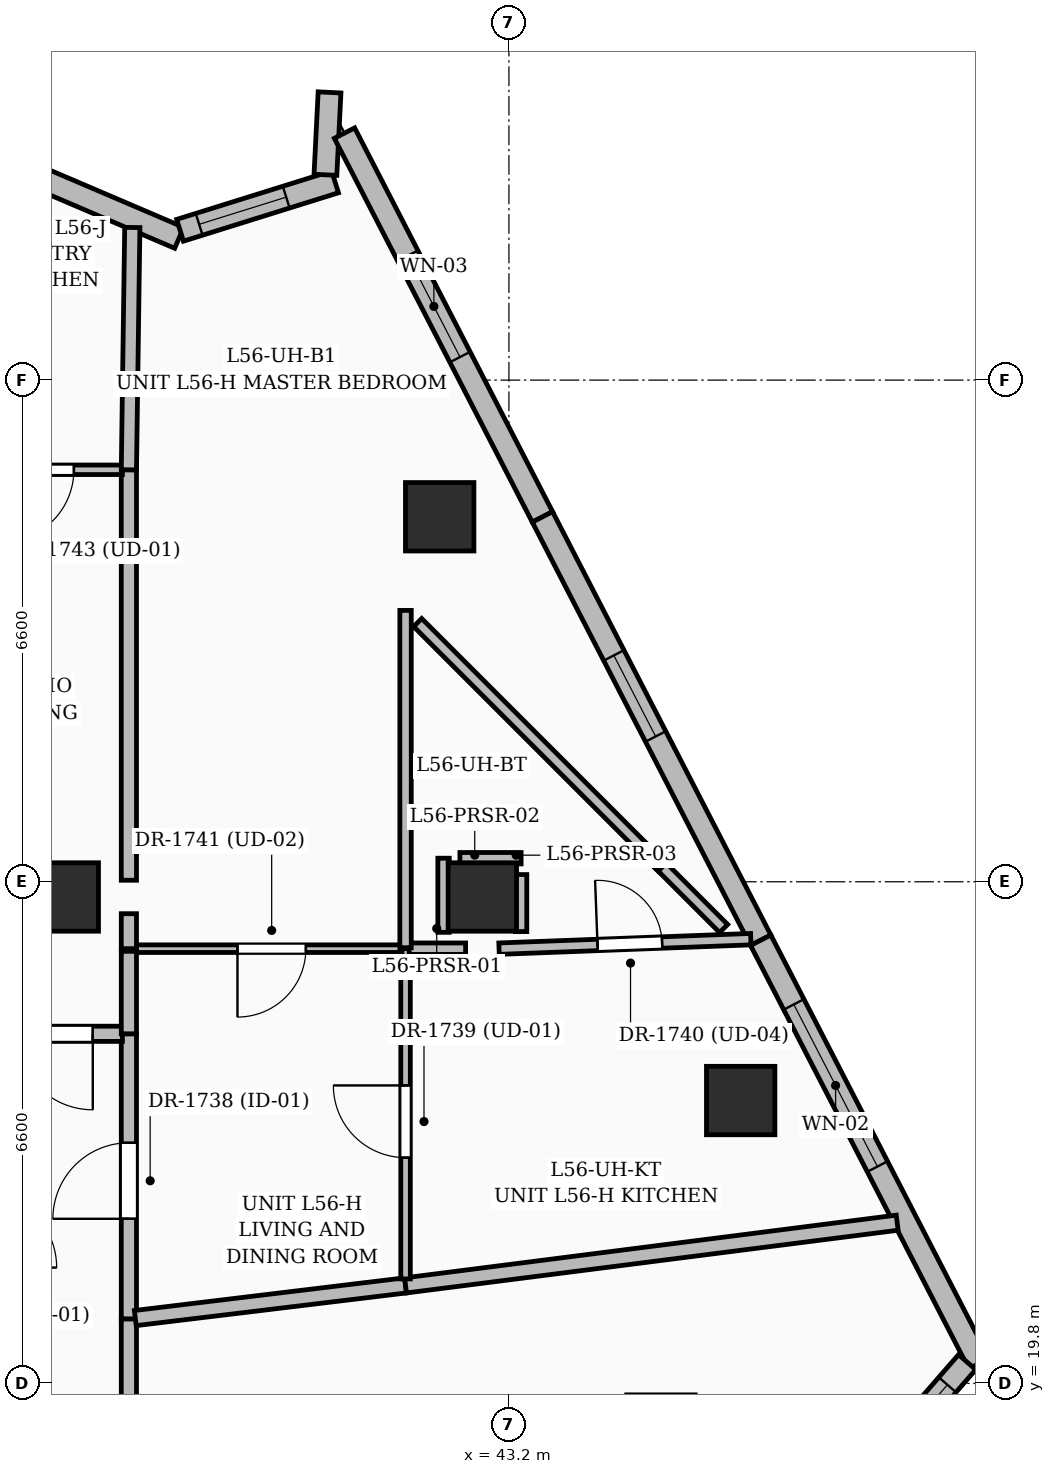
"""IFC4 building model, lengths in metres.
Left out: names, types, materials, properties, quantities, classifications, styles, units other than length and angle.
Written with IfcOpenShell. Run it as: python <this file> out.ifc"""

import sys

from ifc_helpers import new_model, si_unit, direction, frame, frame_2d, origin, origin_2d, place, context, subcontext, project, spatial, rectangle, extrude, element, fill, save


model = new_model("IFC4")
c1 = context("Model", 3, precision=1e-05, world=origin(), true_north=direction((0.0, 1.0)))
c2 = subcontext(c1, "Body", "Model", "MODEL_VIEW")
j1 = project(units=[si_unit("LENGTHUNIT", "METRE"), si_unit("PLANEANGLEUNIT", "RADIAN")], contexts=[c1])
p1 = place(None, origin())
s1 = spatial("IfcSite", under=j1, at=p1, CompositionType="ELEMENT")
p2 = place(p1, origin())
s2 = spatial("IfcBuilding", under=s1, at=p2, CompositionType="ELEMENT")
p3 = place(p2, frame((0.0, 0.0, 218.25)))
s3 = spatial("IfcBuildingStorey", under=s2, at=p3, CompositionType="ELEMENT", Elevation=218.25)
for number, where, z_axis, x_axis in (
    (1, (42.85, 26.2, 0.0), (0.0, 0.0, 1.0), (1.0, 0.0, 0.0)),
    (2, (37.35, 26.2, 0.0), (0.0, 0.0, 1.0), (1.0, 0.0, 0.0)),
    (3, (46.249, 23.522, 0.0), (0.0, 0.0, 1.0), (1.0, 0.0, 0.0)),
    (4, (42.289, 31.202, 0.0), (0.0, 0.0, 1.0), (1.0, 0.0, 0.0)),
):
    element("IfcColumn", number, at=place(p3, frame(where, z_axis=z_axis, x_axis=x_axis)), inside=s3, PredefinedType="COLUMN", context=c2, shape_type="SweptSolid", body=[
        extrude(rectangle(XDim=0.9, YDim=0.9, at=origin_2d()), origin(), (0.0, 0.0, 1.0), 3.75),
    ])
p4 = place(p3, frame((36.887, 35.716, 0.0), z_axis=(0.0, 0.0, 1.0), x_axis=(0.919567916171, -0.392931097711, 0.0)))
e5 = element("IfcWall", 5, at=p4, inside=s3, PredefinedType="SOLIDWALL", context=c2, shape_type="SweptSolid", body=[
    extrude(rectangle(XDim=2.147, YDim=0.3, at=frame_2d((1.074, 0.0))), origin(), (0.0, 0.0, 1.0), 3.5),
])
p5 = place(p3, frame((38.873, 34.971, 0.0), z_axis=(0.0, 0.0, 1.0), x_axis=(0.954555183372, 0.298034229407, 0.0)))
e6 = element("IfcWall", 6, at=p5, inside=s3, PredefinedType="SOLIDWALL", context=c2, shape_type="SweptSolid", body=[
    extrude(rectangle(XDim=2.136, YDim=0.3, at=frame_2d((1.068, 0.0))), origin(), (0.0, 0.0, 1.0), 3.5),
])
p6 = place(p5, frame((0.263, 0.0, 0.8)))
e7 = element("IfcOpeningElement", 7, at=p6, cuts=e6, PredefinedType="OPENING", context=c2, shape_type="SweptSolid", body=[
    extrude(rectangle(XDim=1.2, YDim=1.8, at=frame_2d((0.6, 0.9))), frame((0.0, 0.16, 0.0), z_axis=(0.0, -1.0, 0.0), x_axis=(1.0, 0.0, 0.0)), (0.0, 0.0, 1.0), 0.32),
])
p7 = place(p3, frame((40.786, 35.701, 0.0), z_axis=(0.0, 0.0, 1.0), x_axis=(0.05016199642, 0.998741094636, 0.0)))
e8 = element("IfcWall", 8, at=p7, inside=s3, PredefinedType="SOLIDWALL", context=c2, shape_type="SweptSolid", body=[
    extrude(rectangle(XDim=1.085, YDim=0.3, at=frame_2d((0.543, 0.0))), origin(), (0.0, 0.0, 1.0), 3.5),
])
p8 = place(p3, frame((41.037, 36.25, 0.0), z_axis=(0.0, 0.0, 1.0), x_axis=(0.458317776769, -0.888788397481, 0.0)))
e9 = element("IfcWall", 9, at=p8, inside=s3, PredefinedType="SOLIDWALL", context=c2, shape_type="SweptSolid", body=[
    extrude(rectangle(XDim=5.681, YDim=0.3, at=frame_2d((2.841, 0.0))), origin(), (0.0, 0.0, 1.0), 3.5),
])
p9 = place(p8, frame((1.815, 0.0, 0.6)))
e10 = element("IfcOpeningElement", 10, at=p9, cuts=e9, PredefinedType="OPENING", context=c2, shape_type="SweptSolid", body=[
    extrude(rectangle(XDim=1.5, YDim=2.1, at=frame_2d((0.75, 1.05))), frame((0.0, 0.16, 0.0), z_axis=(0.0, -1.0, 0.0), x_axis=(1.0, 0.0, 0.0)), (0.0, 0.0, 1.0), 0.32),
])
p10 = place(p3, frame((43.641, 31.2, 0.0), z_axis=(0.0, 0.0, 1.0), x_axis=(0.458306446078, -0.88879424024, 0.0)))
e11 = element("IfcWall", 11, at=p10, inside=s3, PredefinedType="SOLIDWALL", context=c2, shape_type="SweptSolid", body=[
    extrude(rectangle(XDim=6.266, YDim=0.3, at=frame_2d((3.133, 0.0))), origin(), (0.0, 0.0, 1.0), 3.5),
])
p11 = place(p10, frame((2.05, 0.0, 0.8)))
e12 = element("IfcOpeningElement", 12, at=p11, cuts=e11, PredefinedType="OPENING", context=c2, shape_type="SweptSolid", body=[
    extrude(rectangle(XDim=1.2, YDim=1.8, at=frame_2d((0.6, 0.9))), frame((0.0, 0.16, 0.0), z_axis=(0.0, -1.0, 0.0), x_axis=(1.0, 0.0, 0.0)), (0.0, 0.0, 1.0), 0.32),
])
p12 = place(p3, frame((46.512, 25.631, 0.0), z_axis=(0.0, 0.0, 1.0), x_axis=(0.458306446078, -0.88879424024, 0.0)))
e13 = element("IfcWall", 13, at=p12, inside=s3, PredefinedType="SOLIDWALL", context=c2, shape_type="SweptSolid", body=[
    extrude(rectangle(XDim=6.266, YDim=0.3, at=frame_2d((3.133, 0.0))), origin(), (0.0, 0.0, 1.0), 3.5),
])
p13 = place(p12, frame((0.95, 0.0, 0.6)))
e14 = element("IfcOpeningElement", 14, at=p13, cuts=e13, PredefinedType="OPENING", context=c2, shape_type="SweptSolid", body=[
    extrude(rectangle(XDim=2.4, YDim=2.1, at=frame_2d((1.2, 1.05))), frame((0.0, 0.16, 0.0), z_axis=(0.0, -1.0, 0.0), x_axis=(1.0, 0.0, 0.0)), (0.0, 0.0, 1.0), 0.32),
])
p14 = place(p3, frame((49.228, 20.08, 0.0), z_axis=(0.0, 0.0, 1.0), x_axis=(-0.656403307356, -0.754410165687, 0.0)))
e15 = element("IfcWall", 15, at=p14, inside=s3, PredefinedType="SOLIDWALL", context=c2, shape_type="SweptSolid", body=[
    extrude(rectangle(XDim=2.314, YDim=0.3, at=frame_2d((1.157, 0.0))), origin(), (0.0, 0.0, 1.0), 2.825),
])
p15 = place(p14, frame((0.395, 0.0, 0.8)))
e16 = element("IfcOpeningElement", 16, at=p15, cuts=e15, PredefinedType="OPENING", context=c2, shape_type="SweptSolid", body=[
    extrude(rectangle(XDim=1.2, YDim=1.8, at=frame_2d((0.6, 0.9))), frame((0.0, 0.16, 0.0), z_axis=(0.0, -1.0, 0.0), x_axis=(1.0, 0.0, 0.0)), (0.0, 0.0, 1.0), 0.32),
])
p16 = place(p3, frame((38.2, 16.835, 0.0), z_axis=(0.0, 0.0, 1.0), x_axis=(0.0, 1.0, 0.0)))
e17 = element("IfcWall", 17, at=p16, inside=s3, PredefinedType="PARTITIONING", context=c2, shape_type="SweptSolid", body=[
    extrude(rectangle(XDim=3.815, YDim=0.2, at=frame_2d((1.907, 0.0))), origin(), (0.0, 0.0, 1.0), 3.5),
])
p17 = place(p3, frame((38.2, 20.65, 0.0), z_axis=(0.0, 0.0, 1.0), x_axis=(0.0, 1.0, 0.0)))
e18 = element("IfcWall", 18, at=p17, inside=s3, PredefinedType="PARTITIONING", context=c2, shape_type="SweptSolid", body=[
    extrude(rectangle(XDim=3.75, YDim=0.2, at=frame_2d((1.875, 0.0))), origin(), (0.0, 0.0, 1.0), 3.5),
])
p18 = place(p17, frame((1.316, 0.0, 0.0)))
e19 = element("IfcOpeningElement", 19, at=p18, cuts=e18, PredefinedType="OPENING", context=c2, shape_type="SweptSolid", body=[
    extrude(rectangle(XDim=1.0, YDim=2.2, at=frame_2d((0.5, 1.1))), frame((0.0, 0.11, 0.0), z_axis=(0.0, -1.0, 0.0), x_axis=(1.0, 0.0, 0.0)), (0.0, 0.0, 1.0), 0.22),
])
p19 = place(p3, frame((38.115, 24.4, 0.0), z_axis=(0.0, 0.0, 1.0), x_axis=(-1.0, 0.0, 0.0)))
e20 = element("IfcWall", 20, at=p19, inside=s3, PredefinedType="PARTITIONING", context=c2, shape_type="SweptSolid", body=[
    extrude(rectangle(XDim=1.865, YDim=0.2, at=frame_2d((0.933, 0.0))), origin(), (0.0, 0.0, 1.0), 2.685),
])
p20 = place(p19, frame((0.39, 0.0, 0.0)))
e21 = element("IfcOpeningElement", 21, at=p20, cuts=e20, PredefinedType="OPENING", context=c2, shape_type="SweptSolid", body=[
    extrude(rectangle(XDim=1.0, YDim=2.2, at=frame_2d((0.5, 1.1))), frame((0.0, 0.11, 0.0), z_axis=(0.0, -1.0, 0.0), x_axis=(1.0, 0.0, 0.0)), (0.0, 0.0, 1.0), 0.22),
])
p21 = place(p3, frame((41.84, 21.09, 0.0), z_axis=(0.0, 0.0, 1.0), x_axis=(-0.99276902526, -0.120040253604, 0.0)))
e22 = element("IfcWall", 22, at=p21, inside=s3, PredefinedType="PARTITIONING", context=c2, shape_type="SweptSolid", body=[
    extrude(rectangle(XDim=3.582, YDim=0.2, at=frame_2d((1.791, 0.0))), origin(), (0.0, 0.0, 1.0), 3.5),
])
p22 = place(p3, frame((48.308, 21.915, 0.0), z_axis=(0.0, 0.0, 1.0), x_axis=(-0.991964283105, -0.126518224158, 0.0)))
e23 = element("IfcWall", 23, at=p22, inside=s3, PredefinedType="PARTITIONING", context=c2, shape_type="SweptSolid", body=[
    extrude(rectangle(XDim=6.521, YDim=0.2, at=frame_2d((3.26, 0.0))), origin(), (0.0, 0.0, 1.0), 2.685),
])
p23 = place(p3, frame((41.84, 21.175, 0.0), z_axis=(0.0, 0.0, 1.0), x_axis=(0.0, 1.0, 0.0)))
e24 = element("IfcWall", 24, at=p23, inside=s3, PredefinedType="PARTITIONING", context=c2, shape_type="SweptSolid", body=[
    extrude(rectangle(XDim=4.345, YDim=0.125, at=frame_2d((2.172, 0.0))), origin(), (0.0, 0.0, 1.0), 3.5),
])
p24 = place(p23, frame((1.596, 0.0, 0.0)))
e25 = element("IfcOpeningElement", 25, at=p24, cuts=e24, PredefinedType="OPENING", context=c2, shape_type="SweptSolid", body=[
    extrude(rectangle(XDim=0.95, YDim=2.2, at=frame_2d((0.475, 1.1))), frame((0.0, 0.072, 0.0), z_axis=(0.0, -1.0, 0.0), x_axis=(1.0, 0.0, 0.0)), (0.0, 0.0, 1.0), 0.145),
])
p25 = place(p3, frame((41.792, 25.52, 0.0), z_axis=(0.0, 0.0, 1.0), x_axis=(-1.0, 0.0, 0.0)))
e26 = element("IfcWall", 26, at=p25, inside=s3, PredefinedType="PARTITIONING", context=c2, shape_type="SweptSolid", body=[
    extrude(rectangle(XDim=3.593, YDim=0.1, at=frame_2d((1.796, 0.0))), origin(), (0.0, 0.0, 1.0), 3.5),
])
p26 = place(p25, frame((1.264, 0.0, 0.0)))
e27 = element("IfcOpeningElement", 27, at=p26, cuts=e26, PredefinedType="OPENING", context=c2, shape_type="SweptSolid", body=[
    extrude(rectangle(XDim=0.9, YDim=2.15, at=frame_2d((0.45, 1.075))), frame((0.0, 0.06, 0.0), z_axis=(0.0, -1.0, 0.0), x_axis=(1.0, 0.0, 0.0)), (0.0, 0.0, 1.0), 0.12),
])
p27 = place(p3, frame((38.2, 25.485, 0.0), z_axis=(0.0, 0.0, 1.0), x_axis=(0.0, -1.0, 0.0)))
e28 = element("IfcWall", 28, at=p27, inside=s3, PredefinedType="PARTITIONING", context=c2, shape_type="SweptSolid", body=[
    extrude(rectangle(XDim=1.085, YDim=0.2, at=frame_2d((0.542, 0.0))), origin(), (0.0, 0.0, 1.0), 3.5),
])
p28 = place(p3, frame((41.887, 25.52, 0.0), z_axis=(0.0, 0.0, 1.0), x_axis=(1.0, 0.0, 0.0)))
e29 = element("IfcWall", 29, at=p28, inside=s3, PredefinedType="PARTITIONING", context=c2, shape_type="SweptSolid", body=[
    extrude(rectangle(XDim=0.742, YDim=0.15, at=frame_2d((0.371, 0.0))), origin(), (0.0, 0.0, 1.0), 3.5),
])
p29 = place(p3, frame((43.07, 25.52, 0.0), z_axis=(0.0, 0.0, 1.0), x_axis=(0.999288552853, 0.037714561334, 0.0)))
e30 = element("IfcWall", 30, at=p29, inside=s3, PredefinedType="PARTITIONING", context=c2, shape_type="SweptSolid", body=[
    extrude(rectangle(XDim=3.314, YDim=0.15, at=frame_2d((1.657, 0.0))), origin(), (0.0, 0.0, 1.0), 2.685),
])
p30 = place(p29, frame((1.296, 0.0, 0.0)))
e31 = element("IfcOpeningElement", 31, at=p30, cuts=e30, PredefinedType="OPENING", context=c2, shape_type="SweptSolid", body=[
    extrude(rectangle(XDim=0.85, YDim=2.1, at=frame_2d((0.425, 1.05))), frame((0.0, 0.085, 0.0), z_axis=(0.0, -1.0, 0.0), x_axis=(1.0, 0.0, 0.0)), (0.0, 0.0, 1.0), 0.17),
])
p31 = place(p3, frame((41.84, 29.97, 0.0), z_axis=(0.0, 0.0, 1.0), x_axis=(0.0, -1.0, 0.0)))
e32 = element("IfcWall", 32, at=p31, inside=s3, PredefinedType="PARTITIONING", context=c2, shape_type="SweptSolid", body=[
    extrude(rectangle(XDim=4.438, YDim=0.15, at=frame_2d((2.219, 0.0))), origin(), (0.0, 0.0, 1.0), 2.52),
])
p32 = place(p3, frame((38.2, 25.98, 0.0), z_axis=(0.0, 0.0, 1.0), x_axis=(0.0, -1.0, 0.0)))
e33 = element("IfcWall", 33, at=p32, inside=s3, PredefinedType="PARTITIONING", context=c2, shape_type="SweptSolid", body=[
    extrude(rectangle(XDim=0.46, YDim=0.2, at=frame_2d((0.23, 0.0))), origin(), (0.0, 0.0, 1.0), 2.52),
])
p33 = place(p3, frame((38.2, 31.82, 0.0), z_axis=(0.0, 0.0, 1.0), x_axis=(0.0, -1.0, 0.0)))
e34 = element("IfcWall", 34, at=p33, inside=s3, PredefinedType="PARTITIONING", context=c2, shape_type="SweptSolid", body=[
    extrude(rectangle(XDim=5.4, YDim=0.2, at=frame_2d((2.7, 0.0))), origin(), (0.0, 0.0, 1.0), 2.52),
])
p34 = place(p3, frame((38.115, 31.82, 0.0), z_axis=(0.0, 0.0, 1.0), x_axis=(-1.0, 0.0, 0.0)))
e35 = element("IfcWall", 35, at=p34, inside=s3, PredefinedType="PARTITIONING", context=c2, shape_type="SweptSolid", body=[
    extrude(rectangle(XDim=2.195, YDim=0.125, at=frame_2d((1.098, 0.0))), origin(), (0.0, 0.0, 1.0), 3.5),
])
p35 = place(p34, frame((0.638, 0.0, 0.0)))
e36 = element("IfcOpeningElement", 36, at=p35, cuts=e35, PredefinedType="OPENING", context=c2, shape_type="SweptSolid", body=[
    extrude(rectangle(XDim=0.95, YDim=2.2, at=frame_2d((0.475, 1.1))), frame((0.0, 0.072, 0.0), z_axis=(0.0, -1.0, 0.0), x_axis=(1.0, 0.0, 0.0)), (0.0, 0.0, 1.0), 0.145),
])
p36 = place(p3, frame((38.245, 35.008, 0.0), z_axis=(0.0, 0.0, 1.0), x_axis=(-0.014166138476, -0.999899655226, 0.0)))
e37 = element("IfcWall", 37, at=p36, inside=s3, PredefinedType="PARTITIONING", context=c2, shape_type="SweptSolid", body=[
    extrude(rectangle(XDim=3.188, YDim=0.2, at=frame_2d((1.594, 0.0))), origin(), (0.0, 0.0, 1.0), 3.5),
])
p37 = place(p3, frame((42.34, 25.735, 0.0), z_axis=(0.0, 0.0, 1.0), x_axis=(0.0, 1.0, 0.0)))
e38 = element("IfcWall", 38, at=p37, inside=s3, PredefinedType="PARTITIONING", context=c2, shape_type="SweptSolid", body=[
    extrude(rectangle(XDim=0.975, YDim=0.15, at=frame_2d((0.487, 0.0))), origin(), (0.0, 0.0, 1.0), 2.52),
])
p38 = place(p3, frame((42.555, 26.71, 0.0), z_axis=(0.0, 0.0, 1.0), x_axis=(1.0, 0.0, 0.0)))
e39 = element("IfcWall", 39, at=p38, inside=s3, PredefinedType="PARTITIONING", context=c2, shape_type="SweptSolid", body=[
    extrude(rectangle(XDim=0.805, YDim=0.15, at=frame_2d((0.403, 0.0))), origin(), (0.0, 0.0, 1.0), 2.685),
])
p39 = place(p3, frame((43.36, 26.495, 0.0), z_axis=(0.0, 0.0, 1.0), x_axis=(0.0, -1.0, 0.0)))
e40 = element("IfcWall", 40, at=p39, inside=s3, PredefinedType="PARTITIONING", context=c2, shape_type="SweptSolid", body=[
    extrude(rectangle(XDim=0.75, YDim=0.15, at=frame_2d((0.375, 0.0))), origin(), (0.0, 0.0, 1.0), 3.5),
])
p40 = place(p3, frame((46.025, 25.785, 0.0), z_axis=(0.0, 0.0, 1.0), x_axis=(-0.707106781187, 0.707106781187, 0.0)))
e41 = element("IfcWall", 41, at=p40, inside=s3, PredefinedType="PARTITIONING", context=c2, shape_type="SweptSolid", body=[
    extrude(rectangle(XDim=1.2, YDim=0.15, at=frame_2d((0.6, 0.0))), origin(), (0.0, 0.0, 1.0), 3.5),
])
p41 = place(p3, frame((45.217, 26.593, 0.0), z_axis=(0.0, 0.0, 1.0), x_axis=(-0.707079952633, 0.707133608723, 0.0)))
e42 = element("IfcWall", 42, at=p41, inside=s3, PredefinedType="PARTITIONING", context=c2, shape_type="SweptSolid", body=[
    extrude(rectangle(XDim=4.55, YDim=0.15, at=frame_2d((2.275, 0.0))), origin(), (0.0, 0.0, 1.0), 3.5),
])
p42 = place(p6, origin())
e43 = element("IfcWindow", 43, at=p42, inside=s3, PartitioningType="SINGLE_PANEL", PredefinedType="WINDOW", context=c2, shape_type="SweptSolid", body=[
    extrude(rectangle(XDim=1.2, YDim=1.8, at=frame_2d((0.6, 0.9))), frame((0.0, 0.03, 0.0), z_axis=(0.0, -1.0, 0.0), x_axis=(1.0, 0.0, 0.0)), (0.0, 0.0, 1.0), 0.06),
])
fill(e7, e43)
p43 = place(p9, origin())
e44 = element("IfcWindow", 44, at=p43, inside=s3, PartitioningType="SINGLE_PANEL", PredefinedType="WINDOW", context=c2, shape_type="SweptSolid", body=[
    extrude(rectangle(XDim=1.5, YDim=2.1, at=frame_2d((0.75, 1.05))), frame((0.0, 0.03, 0.0), z_axis=(0.0, -1.0, 0.0), x_axis=(1.0, 0.0, 0.0)), (0.0, 0.0, 1.0), 0.06),
])
fill(e10, e44)
p44 = place(p11, origin())
e45 = element("IfcWindow", 45, at=p44, inside=s3, PartitioningType="SINGLE_PANEL", PredefinedType="WINDOW", context=c2, shape_type="SweptSolid", body=[
    extrude(rectangle(XDim=1.2, YDim=1.8, at=frame_2d((0.6, 0.9))), frame((0.0, 0.03, 0.0), z_axis=(0.0, -1.0, 0.0), x_axis=(1.0, 0.0, 0.0)), (0.0, 0.0, 1.0), 0.06),
])
fill(e12, e45)
p45 = place(p13, origin())
e46 = element("IfcWindow", 46, at=p45, inside=s3, PartitioningType="SINGLE_PANEL", PredefinedType="WINDOW", context=c2, shape_type="SweptSolid", body=[
    extrude(rectangle(XDim=2.4, YDim=2.1, at=frame_2d((1.2, 1.05))), frame((0.0, 0.03, 0.0), z_axis=(0.0, -1.0, 0.0), x_axis=(1.0, 0.0, 0.0)), (0.0, 0.0, 1.0), 0.06),
])
fill(e14, e46)
p46 = place(p15, origin())
e47 = element("IfcWindow", 47, at=p46, inside=s3, PartitioningType="SINGLE_PANEL", PredefinedType="WINDOW", context=c2, shape_type="SweptSolid", body=[
    extrude(rectangle(XDim=1.2, YDim=1.8, at=frame_2d((0.6, 0.9))), frame((0.0, 0.03, 0.0), z_axis=(0.0, -1.0, 0.0), x_axis=(1.0, 0.0, 0.0)), (0.0, 0.0, 1.0), 0.06),
])
fill(e16, e47)
p47 = place(p18, origin())
e48 = element("IfcDoor", 48, at=p47, inside=s3, OperationType="SINGLE_SWING_LEFT", PredefinedType="DOOR", context=c2, shape_type="SweptSolid", body=[
    extrude(rectangle(XDim=1.0, YDim=2.2, at=frame_2d((0.5, 1.1))), frame((0.0, 0.025, 0.0), z_axis=(0.0, -1.0, 0.0), x_axis=(1.0, 0.0, 0.0)), (0.0, 0.0, 1.0), 0.05),
])
fill(e19, e48)
p48 = place(p24, origin())
e49 = element("IfcDoor", 49, at=p48, inside=s3, OperationType="SINGLE_SWING_RIGHT", PredefinedType="DOOR", context=c2, shape_type="SweptSolid", body=[
    extrude(rectangle(XDim=0.95, YDim=2.2, at=frame_2d((0.475, 1.1))), frame((0.0, 0.025, 0.0), z_axis=(0.0, -1.0, 0.0), x_axis=(1.0, 0.0, 0.0)), (0.0, 0.0, 1.0), 0.05),
])
fill(e25, e49)
p49 = place(p30, origin())
e50 = element("IfcDoor", 50, at=p49, inside=s3, OperationType="SINGLE_SWING_LEFT", PredefinedType="DOOR", context=c2, shape_type="SweptSolid", body=[
    extrude(rectangle(XDim=0.85, YDim=2.1, at=frame_2d((0.425, 1.05))), frame((0.0, 0.025, 0.0), z_axis=(0.0, -1.0, 0.0), x_axis=(1.0, 0.0, 0.0)), (0.0, 0.0, 1.0), 0.05),
])
fill(e31, e50)
p50 = place(p26, origin())
e51 = element("IfcDoor", 51, at=p50, inside=s3, OperationType="SINGLE_SWING_RIGHT", PredefinedType="DOOR", context=c2, shape_type="SweptSolid", body=[
    extrude(rectangle(XDim=0.9, YDim=2.15, at=frame_2d((0.45, 1.075))), frame((0.0, 0.025, 0.0), z_axis=(0.0, -1.0, 0.0), x_axis=(1.0, 0.0, 0.0)), (0.0, 0.0, 1.0), 0.05),
])
fill(e27, e51)
p51 = place(p20, origin())
e52 = element("IfcDoor", 52, at=p51, inside=s3, OperationType="SINGLE_SWING_LEFT", PredefinedType="DOOR", context=c2, shape_type="SweptSolid", body=[
    extrude(rectangle(XDim=1.0, YDim=2.2, at=frame_2d((0.5, 1.1))), frame((0.0, 0.025, 0.0), z_axis=(0.0, -1.0, 0.0), x_axis=(1.0, 0.0, 0.0)), (0.0, 0.0, 1.0), 0.05),
])
fill(e21, e52)
p52 = place(p35, origin())
e53 = element("IfcDoor", 53, at=p52, inside=s3, OperationType="SINGLE_SWING_RIGHT", PredefinedType="DOOR", context=c2, shape_type="SweptSolid", body=[
    extrude(rectangle(XDim=0.95, YDim=2.2, at=frame_2d((0.475, 1.1))), frame((0.0, 0.025, 0.0), z_axis=(0.0, -1.0, 0.0), x_axis=(1.0, 0.0, 0.0)), (0.0, 0.0, 1.0), 0.05),
])
fill(e36, e53)
save(model, sys.argv[1])
